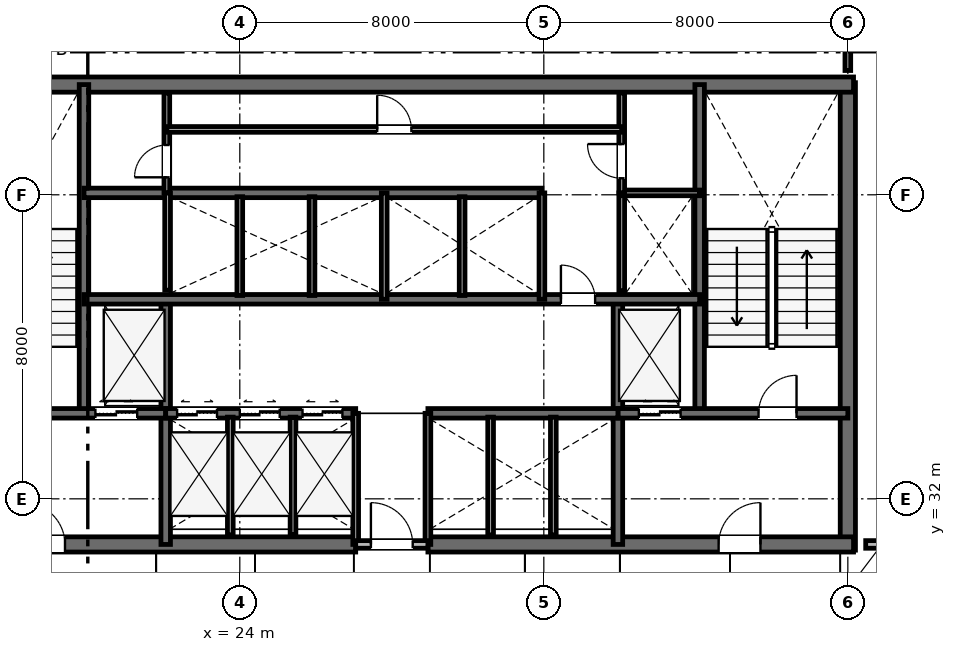
"""IFC4 building model, lengths in metres.
Left out: names, types, materials, properties, quantities, classifications, styles, units other than length and angle.
Written with IfcOpenShell. Run it as: python <this file> out.ifc"""

import sys

from ifc_helpers import new_model, si_unit, direction, frame, frame_2d, origin, place, context, subcontext, project, spatial, rectangle, extrude, element, fill, save


model = new_model("IFC4")
c1 = context("Model", 3, precision=1e-05, world=origin(), true_north=direction((0.0, 1.0)))
c2 = subcontext(c1, "Body", "Model", "MODEL_VIEW")
j1 = project(units=[si_unit("LENGTHUNIT", "METRE"), si_unit("PLANEANGLEUNIT", "RADIAN")], contexts=[c1])
p1 = place(None, origin())
s1 = spatial("IfcSite", under=j1, at=p1, CompositionType="ELEMENT")
p2 = place(p1, origin())
s2 = spatial("IfcBuilding", under=s1, at=p2, CompositionType="ELEMENT")
p3 = place(p2, frame((0.0, 0.0, 61.8)))
s3 = spatial("IfcBuildingStorey", under=s2, at=p3, CompositionType="ELEMENT", Elevation=61.8)
p4 = place(p3, frame((40.0, 30.65, 0.0), z_axis=(0.0, 0.0, 1.0), x_axis=(0.0, 1.0, 0.0)))
e1 = element("IfcWall", 1, at=p4, inside=s3, PredefinedType="SHEAR", context=c2, shape_type="SweptSolid", body=[
    extrude(rectangle(XDim=12.3, YDim=0.4, at=frame_2d((6.15, 0.0))), origin(), (0.0, 0.0, 1.0), 3.6),
])
p5 = place(p3, frame((15.85, 42.9, 0.0), z_axis=(0.0, 0.0, 1.0), x_axis=(1.0, 0.0, 0.0)))
e2 = element("IfcWall", 2, at=p5, inside=s3, PredefinedType="SHEAR", context=c2, shape_type="SweptSolid", body=[
    extrude(rectangle(XDim=24.3, YDim=0.4, at=frame_2d((12.15, 0.0))), origin(), (0.0, 0.0, 1.0), 3.6),
])
p6 = place(p3, frame((15.85, 30.8, 0.0), z_axis=(0.0, 0.0, 1.0), x_axis=(1.0, 0.0, 0.0)))
e3 = element("IfcWall", 3, at=p6, inside=s3, PredefinedType="SHEAR", context=c2, shape_type="SweptSolid", body=[
    extrude(rectangle(XDim=11.2, YDim=0.4, at=frame_2d((5.6, 0.0))), origin(), (0.0, 0.0, 1.0), 3.6),
])
p7 = place(p6, frame((2.45, 0.0, 0.0)))
e4 = element("IfcOpeningElement", 4, at=p7, cuts=e3, PredefinedType="OPENING", context=c2, shape_type="SweptSolid", body=[
    extrude(rectangle(XDim=1.1, YDim=2.15, at=frame_2d((0.55, 1.075))), frame((0.0, 0.21, 0.0), z_axis=(0.0, -1.0, 0.0), x_axis=(1.0, 0.0, 0.0)), (0.0, 0.0, 1.0), 0.42),
])
p8 = place(p3, frame((28.95, 30.8, 0.0), z_axis=(0.0, 0.0, 1.0), x_axis=(1.0, 0.0, 0.0)))
e5 = element("IfcWall", 5, at=p8, inside=s3, PredefinedType="SHEAR", context=c2, shape_type="SweptSolid", body=[
    extrude(rectangle(XDim=11.2, YDim=0.4, at=frame_2d((5.6, 0.0))), origin(), (0.0, 0.0, 1.0), 3.6),
])
p9 = place(p8, frame((7.65, 0.0, 0.0)))
e6 = element("IfcOpeningElement", 6, at=p9, cuts=e5, PredefinedType="OPENING", context=c2, shape_type="SweptSolid", body=[
    extrude(rectangle(XDim=1.1, YDim=2.15, at=frame_2d((0.55, 1.075))), frame((0.0, 0.21, 0.0), z_axis=(0.0, -1.0, 0.0), x_axis=(1.0, 0.0, 0.0)), (0.0, 0.0, 1.0), 0.42),
])
for number, where, z_axis, x_axis in (
    (7, (19.9, 34.25, 0.0), (0.0, 0.0, 1.0), (0.0, 1.0, 0.0)),
    (8, (36.1, 34.25, 0.0), (0.0, 0.0, 1.0), (0.0, 1.0, 0.0)),
):
    element("IfcWall", number, at=place(p3, frame(where, z_axis=z_axis, x_axis=x_axis)), inside=s3, PredefinedType="SHEAR", context=c2, shape_type="SweptSolid", body=[
        extrude(rectangle(XDim=8.65, YDim=0.25, at=frame_2d((4.325, 0.0))), origin(), (0.0, 0.0, 1.0), 3.6),
    ])
for number, where, z_axis, x_axis in (
    (9, (22.05, 30.8, 0.0), (0.0, 0.0, 1.0), (0.0, 1.0, 0.0)),
    (10, (33.95, 30.8, 0.0), (0.0, 0.0, 1.0), (0.0, 1.0, 0.0)),
):
    element("IfcWall", number, at=place(p3, frame(where, z_axis=z_axis, x_axis=x_axis)), inside=s3, PredefinedType="SHEAR", context=c2, shape_type="SweptSolid", body=[
        extrude(rectangle(XDim=6.45, YDim=0.25, at=frame_2d((3.225, 0.0))), origin(), (0.0, 0.0, 1.0), 3.6),
    ])
p10 = place(p3, frame((16.0, 34.25, 0.0), z_axis=(0.0, 0.0, 1.0), x_axis=(1.0, 0.0, 0.0)))
e11 = element("IfcWall", 11, at=p10, inside=s3, PredefinedType="SHEAR", context=c2, shape_type="SweptSolid", body=[
    extrude(rectangle(XDim=6.05, YDim=0.25, at=frame_2d((3.025, 0.0))), origin(), (0.0, 0.0, 1.0), 3.6),
])
p11 = place(p10, frame((1.25, 0.0, 0.0)))
e12 = element("IfcOpeningElement", 12, at=p11, cuts=e11, PredefinedType="OPENING", context=c2, shape_type="SweptSolid", body=[
    extrude(rectangle(XDim=1.0, YDim=2.15, at=frame_2d((0.5, 1.075))), frame((0.0, 0.135, 0.0), z_axis=(0.0, -1.0, 0.0), x_axis=(1.0, 0.0, 0.0)), (0.0, 0.0, 1.0), 0.27),
])
p12 = place(p10, frame((4.2, 0.0, 0.0)))
e13 = element("IfcOpeningElement", 13, at=p12, cuts=e11, PredefinedType="OPENING", context=c2, shape_type="SweptSolid", body=[
    extrude(rectangle(XDim=1.1, YDim=2.15, at=frame_2d((0.55, 1.075))), frame((0.0, 0.135, 0.0), z_axis=(0.0, -1.0, 0.0), x_axis=(1.0, 0.0, 0.0)), (0.0, 0.0, 1.0), 0.27),
])
p13 = place(p3, frame((33.95, 34.25, 0.0), z_axis=(0.0, 0.0, 1.0), x_axis=(1.0, 0.0, 0.0)))
e14 = element("IfcWall", 14, at=p13, inside=s3, PredefinedType="SHEAR", context=c2, shape_type="SweptSolid", body=[
    extrude(rectangle(XDim=6.05, YDim=0.25, at=frame_2d((3.025, 0.0))), origin(), (0.0, 0.0, 1.0), 3.6),
])
p14 = place(p13, frame((3.7, 0.0, 0.0)))
e15 = element("IfcOpeningElement", 15, at=p14, cuts=e14, PredefinedType="OPENING", context=c2, shape_type="SweptSolid", body=[
    extrude(rectangle(XDim=1.0, YDim=2.15, at=frame_2d((0.5, 1.075))), frame((0.0, 0.135, 0.0), z_axis=(0.0, -1.0, 0.0), x_axis=(1.0, 0.0, 0.0)), (0.0, 0.0, 1.0), 0.27),
])
p15 = place(p13, frame((0.55, 0.0, 0.0)))
e16 = element("IfcOpeningElement", 16, at=p15, cuts=e14, PredefinedType="OPENING", context=c2, shape_type="SweptSolid", body=[
    extrude(rectangle(XDim=1.1, YDim=2.15, at=frame_2d((0.55, 1.075))), frame((0.0, 0.135, 0.0), z_axis=(0.0, -1.0, 0.0), x_axis=(1.0, 0.0, 0.0)), (0.0, 0.0, 1.0), 0.27),
])
p16 = place(p3, frame((22.05, 34.25, 0.0), z_axis=(0.0, 0.0, 1.0), x_axis=(1.0, 0.0, 0.0)))
e17 = element("IfcWall", 17, at=p16, inside=s3, PredefinedType="SHEAR", context=c2, shape_type="SweptSolid", body=[
    extrude(rectangle(XDim=5.0, YDim=0.25, at=frame_2d((2.5, 0.0))), origin(), (0.0, 0.0, 1.0), 3.6),
])
p17 = place(p16, frame((0.3, 0.0, 0.0)))
e18 = element("IfcOpeningElement", 18, at=p17, cuts=e17, PredefinedType="OPENING", context=c2, shape_type="SweptSolid", body=[
    extrude(rectangle(XDim=1.05, YDim=2.15, at=frame_2d((0.525, 1.075))), frame((0.0, 0.135, 0.0), z_axis=(0.0, -1.0, 0.0), x_axis=(1.0, 0.0, 0.0)), (0.0, 0.0, 1.0), 0.27),
])
p18 = place(p16, frame((1.95, 0.0, 0.0)))
e19 = element("IfcOpeningElement", 19, at=p18, cuts=e17, PredefinedType="OPENING", context=c2, shape_type="SweptSolid", body=[
    extrude(rectangle(XDim=1.05, YDim=2.15, at=frame_2d((0.525, 1.075))), frame((0.0, 0.135, 0.0), z_axis=(0.0, -1.0, 0.0), x_axis=(1.0, 0.0, 0.0)), (0.0, 0.0, 1.0), 0.27),
])
p19 = place(p16, frame((3.6, 0.0, 0.0)))
e20 = element("IfcOpeningElement", 20, at=p19, cuts=e17, PredefinedType="OPENING", context=c2, shape_type="SweptSolid", body=[
    extrude(rectangle(XDim=1.05, YDim=2.15, at=frame_2d((0.525, 1.075))), frame((0.0, 0.135, 0.0), z_axis=(0.0, -1.0, 0.0), x_axis=(1.0, 0.0, 0.0)), (0.0, 0.0, 1.0), 0.27),
])
p20 = place(p3, frame((28.95, 34.25, 0.0), z_axis=(0.0, 0.0, 1.0), x_axis=(1.0, 0.0, 0.0)))
e21 = element("IfcWall", 21, at=p20, inside=s3, PredefinedType="SHEAR", context=c2, shape_type="SweptSolid", body=[
    extrude(rectangle(XDim=5.0, YDim=0.25, at=frame_2d((2.5, 0.0))), origin(), (0.0, 0.0, 1.0), 3.6),
])
p21 = place(p3, frame((19.9, 37.25, 0.0), z_axis=(0.0, 0.0, 1.0), x_axis=(1.0, 0.0, 0.0)))
e22 = element("IfcWall", 22, at=p21, inside=s3, PredefinedType="SHEAR", context=c2, shape_type="SweptSolid", body=[
    extrude(rectangle(XDim=16.2, YDim=0.25, at=frame_2d((8.1, 0.0))), origin(), (0.0, 0.0, 1.0), 3.6),
])
p22 = place(p21, frame((12.55, 0.0, 0.0)))
e23 = element("IfcOpeningElement", 23, at=p22, cuts=e22, PredefinedType="OPENING", context=c2, shape_type="SweptSolid", body=[
    extrude(rectangle(XDim=0.9, YDim=2.15, at=frame_2d((0.45, 1.075))), frame((0.0, 0.135, 0.0), z_axis=(0.0, -1.0, 0.0), x_axis=(1.0, 0.0, 0.0)), (0.0, 0.0, 1.0), 0.27),
])
p23 = place(p3, frame((19.9, 40.05, 0.0), z_axis=(0.0, 0.0, 1.0), x_axis=(1.0, 0.0, 0.0)))
e24 = element("IfcWall", 24, at=p23, inside=s3, PredefinedType="SHEAR", context=c2, shape_type="SweptSolid", body=[
    extrude(rectangle(XDim=12.05, YDim=0.25, at=frame_2d((6.025, 0.0))), origin(), (0.0, 0.0, 1.0), 3.6),
])
for number, where, z_axis, x_axis in (
    (25, (27.05, 30.8, 0.0), (0.0, 0.0, 1.0), (0.0, 1.0, 0.0)),
    (26, (28.95, 30.8, 0.0), (0.0, 0.0, 1.0), (0.0, 1.0, 0.0)),
):
    element("IfcWall", number, at=place(p3, frame(where, z_axis=z_axis, x_axis=x_axis)), inside=s3, PredefinedType="PLUMBINGWALL", context=c2, shape_type="SweptSolid", body=[
        extrude(rectangle(XDim=3.45, YDim=0.15, at=frame_2d((1.725, 0.0))), origin(), (0.0, 0.0, 1.0), 3.33),
    ])
p24 = place(p3, frame((27.05, 30.8, 0.0), z_axis=(0.0, 0.0, 1.0), x_axis=(1.0, 0.0, 0.0)))
e27 = element("IfcWall", 27, at=p24, inside=s3, PredefinedType="PARTITIONING", context=c2, shape_type="SweptSolid", body=[
    extrude(rectangle(XDim=1.9, YDim=0.2, at=frame_2d((0.95, 0.0))), origin(), (0.0, 0.0, 1.0), 3.33),
])
p25 = place(p24, frame((0.4, 0.0, 0.0)))
e28 = element("IfcOpeningElement", 28, at=p25, cuts=e27, PredefinedType="OPENING", context=c2, shape_type="SweptSolid", body=[
    extrude(rectangle(XDim=1.1, YDim=2.15, at=frame_2d((0.55, 1.075))), frame((0.0, 0.11, 0.0), z_axis=(0.0, -1.0, 0.0), x_axis=(1.0, 0.0, 0.0)), (0.0, 0.0, 1.0), 0.22),
])
for number, where, z_axis, x_axis in (
    (29, (23.75, 31.05, 0.0), (0.0, 0.0, 1.0), (0.0, 1.0, 0.0)),
    (30, (25.4, 31.05, 0.0), (0.0, 0.0, 1.0), (0.0, 1.0, 0.0)),
    (31, (30.6, 31.05, 0.0), (0.0, 0.0, 1.0), (0.0, 1.0, 0.0)),
    (32, (32.25, 31.05, 0.0), (0.0, 0.0, 1.0), (0.0, 1.0, 0.0)),
):
    element("IfcWall", number, at=place(p3, frame(where, z_axis=z_axis, x_axis=x_axis)), inside=s3, PredefinedType="PLUMBINGWALL", context=c2, shape_type="SweptSolid", body=[
        extrude(rectangle(XDim=3.1, YDim=0.15, at=frame_2d((1.55, 0.0))), origin(), (0.0, 0.0, 1.0), 3.33),
    ])
p26 = place(p3, frame((22.1, 37.49, 0.0), z_axis=(0.0, 0.0, 1.0), x_axis=(0.0, 1.0, 0.0)))
e33 = element("IfcWall", 33, at=p26, inside=s3, PredefinedType="PLUMBINGWALL", context=c2, shape_type="SweptSolid", body=[
    extrude(rectangle(XDim=2.56, YDim=0.15, at=frame_2d((1.28, 0.0))), origin(), (0.0, 0.0, 1.0), 3.33),
])
p27 = place(p3, frame((27.8, 37.25, 0.0), z_axis=(0.0, 0.0, 1.0), x_axis=(0.0, 1.0, 0.0)))
e34 = element("IfcWall", 34, at=p27, inside=s3, PredefinedType="PLUMBINGWALL", context=c2, shape_type="SweptSolid", body=[
    extrude(rectangle(XDim=2.8, YDim=0.15, at=frame_2d((1.4, 0.0))), origin(), (0.0, 0.0, 1.0), 3.33),
])
for number, where, z_axis, x_axis in (
    (35, (24.0, 37.35, 0.0), (0.0, 0.0, 1.0), (0.0, 1.0, 0.0)),
    (36, (25.9, 37.35, 0.0), (0.0, 0.0, 1.0), (0.0, 1.0, 0.0)),
):
    element("IfcWall", number, at=place(p3, frame(where, z_axis=z_axis, x_axis=x_axis)), inside=s3, PredefinedType="PLUMBINGWALL", context=c2, shape_type="SweptSolid", body=[
        extrude(rectangle(XDim=2.6, YDim=0.15, at=frame_2d((1.3, 0.0))), origin(), (0.0, 0.0, 1.0), 3.33),
    ])
p28 = place(p3, frame((31.95, 37.25, 0.0), z_axis=(0.0, 0.0, 1.0), x_axis=(0.0, 1.0, 0.0)))
e37 = element("IfcWall", 37, at=p28, inside=s3, PredefinedType="PLUMBINGWALL", context=c2, shape_type="SweptSolid", body=[
    extrude(rectangle(XDim=2.8, YDim=0.15, at=frame_2d((1.4, 0.0))), origin(), (0.0, 0.0, 1.0), 3.33),
])
p29 = place(p3, frame((29.85, 37.35, 0.0), z_axis=(0.0, 0.0, 1.0), x_axis=(0.0, 1.0, 0.0)))
e38 = element("IfcWall", 38, at=p29, inside=s3, PredefinedType="PLUMBINGWALL", context=c2, shape_type="SweptSolid", body=[
    extrude(rectangle(XDim=2.6, YDim=0.15, at=frame_2d((1.3, 0.0))), origin(), (0.0, 0.0, 1.0), 3.33),
])
p30 = place(p3, frame((34.05, 37.473, 0.0), z_axis=(0.0, 0.0, 1.0), x_axis=(0.0, 1.0, 0.0)))
e39 = element("IfcWall", 39, at=p30, inside=s3, PredefinedType="PLUMBINGWALL", context=c2, shape_type="SweptSolid", body=[
    extrude(rectangle(XDim=2.577, YDim=0.15, at=frame_2d((1.288, 0.0))), origin(), (0.0, 0.0, 1.0), 3.33),
])
p31 = place(p3, frame((34.05, 40.05, 0.0), z_axis=(0.0, 0.0, 1.0), x_axis=(1.0, 0.0, 0.0)))
e40 = element("IfcWall", 40, at=p31, inside=s3, PredefinedType="PARTITIONING", context=c2, shape_type="SweptSolid", body=[
    extrude(rectangle(XDim=2.05, YDim=0.15, at=frame_2d((1.025, 0.0))), origin(), (0.0, 0.0, 1.0), 3.33),
])
p32 = place(p3, frame((34.05, 40.05, 0.0), z_axis=(0.0, 0.0, 1.0), x_axis=(0.0, 1.0, 0.0)))
e41 = element("IfcWall", 41, at=p32, inside=s3, PredefinedType="PARTITIONING", context=c2, shape_type="SweptSolid", body=[
    extrude(rectangle(XDim=2.63, YDim=0.15, at=frame_2d((1.315, 0.0))), origin(), (0.0, 0.0, 1.0), 3.33),
])
p33 = place(p32, frame((0.385, 0.0, 0.0)))
e42 = element("IfcOpeningElement", 42, at=p33, cuts=e41, PredefinedType="OPENING", context=c2, shape_type="SweptSolid", body=[
    extrude(rectangle(XDim=0.9, YDim=2.15, at=frame_2d((0.45, 1.075))), frame((0.0, 0.085, 0.0), z_axis=(0.0, -1.0, 0.0), x_axis=(1.0, 0.0, 0.0)), (0.0, 0.0, 1.0), 0.17),
])
p34 = place(p3, frame((22.08, 40.05, 0.0), z_axis=(0.0, 0.0, 1.0), x_axis=(0.0, 1.0, 0.0)))
e43 = element("IfcWall", 43, at=p34, inside=s3, PredefinedType="PARTITIONING", context=c2, shape_type="SweptSolid", body=[
    extrude(rectangle(XDim=2.63, YDim=0.15, at=frame_2d((1.315, 0.0))), origin(), (0.0, 0.0, 1.0), 3.33),
])
p35 = place(p34, frame((0.41, 0.0, 0.0)))
e44 = element("IfcOpeningElement", 44, at=p35, cuts=e43, PredefinedType="OPENING", context=c2, shape_type="SweptSolid", body=[
    extrude(rectangle(XDim=0.85, YDim=2.15, at=frame_2d((0.425, 1.075))), frame((0.0, 0.085, 0.0), z_axis=(0.0, -1.0, 0.0), x_axis=(1.0, 0.0, 0.0)), (0.0, 0.0, 1.0), 0.17),
])
p36 = place(p3, frame((22.08, 41.72, 0.0), z_axis=(0.0, 0.0, 1.0), x_axis=(1.0, 0.0, 0.0)))
e45 = element("IfcWall", 45, at=p36, inside=s3, PredefinedType="PARTITIONING", context=c2, shape_type="SweptSolid", body=[
    extrude(rectangle(XDim=11.97, YDim=0.15, at=frame_2d((5.985, 0.0))), origin(), (0.0, 0.0, 1.0), 3.33),
])
p37 = place(p36, frame((5.535, 0.0, 0.0)))
e46 = element("IfcOpeningElement", 46, at=p37, cuts=e45, PredefinedType="OPENING", context=c2, shape_type="SweptSolid", body=[
    extrude(rectangle(XDim=0.9, YDim=2.15, at=frame_2d((0.45, 1.075))), frame((0.0, 0.085, 0.0), z_axis=(0.0, -1.0, 0.0), x_axis=(1.0, 0.0, 0.0)), (0.0, 0.0, 1.0), 0.17),
])
p38 = place(p3, frame((40.0, 43.27, 0.0), z_axis=(0.0, 0.0, 1.0), x_axis=(0.0, 1.0, 0.0)))
e47 = element("IfcWall", 47, at=p38, inside=s3, PredefinedType="PARTITIONING", context=c2, shape_type="SweptSolid", body=[
    extrude(rectangle(XDim=4.63, YDim=0.15, at=frame_2d((2.315, 0.0))), origin(), (0.0, 0.0, 1.0), 2.93),
])
p39 = place(p3, frame((40.47, 30.8, 0.0), z_axis=(0.0, 0.0, 1.0), x_axis=(1.0, 0.0, 0.0)))
e48 = element("IfcWall", 48, at=p39, inside=s3, PredefinedType="PARTITIONING", context=c2, shape_type="SweptSolid", body=[
    extrude(rectangle(XDim=15.43, YDim=0.2, at=frame_2d((7.715, 0.0))), origin(), (0.0, 0.0, 1.0), 2.82),
])
p40 = place(p39, frame((6.673, 0.0, 0.0)))
e49 = element("IfcOpeningElement", 49, at=p40, cuts=e48, PredefinedType="OPENING", context=c2, shape_type="SweptSolid", body=[
    extrude(rectangle(XDim=0.95, YDim=2.15, at=frame_2d((0.475, 1.075))), frame((0.0, 0.11, 0.0), z_axis=(0.0, -1.0, 0.0), x_axis=(1.0, 0.0, 0.0)), (0.0, 0.0, 1.0), 0.22),
])
p41 = place(p25, origin())
e50 = element("IfcDoor", 50, at=p41, inside=s3, OperationType="SINGLE_SWING_LEFT", PredefinedType="DOOR", context=c2, shape_type="SweptSolid", body=[
    extrude(rectangle(XDim=1.1, YDim=2.15, at=frame_2d((0.55, 1.075))), frame((0.0, 0.025, 0.0), z_axis=(0.0, -1.0, 0.0), x_axis=(1.0, 0.0, 0.0)), (0.0, 0.0, 1.0), 0.05),
])
fill(e28, e50)
p42 = place(p14, origin())
e51 = element("IfcDoor", 51, at=p42, inside=s3, OperationType="SINGLE_SWING_RIGHT", PredefinedType="DOOR", context=c2, shape_type="SweptSolid", body=[
    extrude(rectangle(XDim=1.0, YDim=2.15, at=frame_2d((0.5, 1.075))), frame((0.0, 0.025, 0.0), z_axis=(0.0, -1.0, 0.0), x_axis=(1.0, 0.0, 0.0)), (0.0, 0.0, 1.0), 0.05),
])
fill(e15, e51)
p43 = place(p7, origin())
e52 = element("IfcDoor", 52, at=p43, inside=s3, OperationType="SINGLE_SWING_LEFT", PredefinedType="DOOR", context=c2, shape_type="SweptSolid", body=[
    extrude(rectangle(XDim=1.1, YDim=2.15, at=frame_2d((0.55, 1.075))), frame((0.0, 0.025, 0.0), z_axis=(0.0, -1.0, 0.0), x_axis=(1.0, 0.0, 0.0)), (0.0, 0.0, 1.0), 0.05),
])
fill(e4, e52)
p44 = place(p9, origin())
e53 = element("IfcDoor", 53, at=p44, inside=s3, OperationType="SINGLE_SWING_RIGHT", PredefinedType="DOOR", context=c2, shape_type="SweptSolid", body=[
    extrude(rectangle(XDim=1.1, YDim=2.15, at=frame_2d((0.55, 1.075))), frame((0.0, 0.025, 0.0), z_axis=(0.0, -1.0, 0.0), x_axis=(1.0, 0.0, 0.0)), (0.0, 0.0, 1.0), 0.05),
])
fill(e6, e53)
p45 = place(p22, origin())
e54 = element("IfcDoor", 54, at=p45, inside=s3, OperationType="SINGLE_SWING_LEFT", PredefinedType="DOOR", context=c2, shape_type="SweptSolid", body=[
    extrude(rectangle(XDim=0.9, YDim=2.15, at=frame_2d((0.45, 1.075))), frame((0.0, 0.025, 0.0), z_axis=(0.0, -1.0, 0.0), x_axis=(1.0, 0.0, 0.0)), (0.0, 0.0, 1.0), 0.05),
])
fill(e23, e54)
p46 = place(p33, origin())
e55 = element("IfcDoor", 55, at=p46, inside=s3, OperationType="SINGLE_SWING_RIGHT", PredefinedType="DOOR", context=c2, shape_type="SweptSolid", body=[
    extrude(rectangle(XDim=0.9, YDim=2.15, at=frame_2d((0.45, 1.075))), frame((0.0, 0.025, 0.0), z_axis=(0.0, -1.0, 0.0), x_axis=(1.0, 0.0, 0.0)), (0.0, 0.0, 1.0), 0.05),
])
fill(e42, e55)
p47 = place(p35, origin())
e56 = element("IfcDoor", 56, at=p47, inside=s3, OperationType="SINGLE_SWING_LEFT", PredefinedType="DOOR", context=c2, shape_type="SweptSolid", body=[
    extrude(rectangle(XDim=0.85, YDim=2.15, at=frame_2d((0.425, 1.075))), frame((0.0, 0.025, 0.0), z_axis=(0.0, -1.0, 0.0), x_axis=(1.0, 0.0, 0.0)), (0.0, 0.0, 1.0), 0.05),
])
fill(e44, e56)
p48 = place(p37, origin())
e57 = element("IfcDoor", 57, at=p48, inside=s3, OperationType="SINGLE_SWING_LEFT", PredefinedType="DOOR", context=c2, shape_type="SweptSolid", body=[
    extrude(rectangle(XDim=0.9, YDim=2.15, at=frame_2d((0.45, 1.075))), frame((0.0, 0.025, 0.0), z_axis=(0.0, -1.0, 0.0), x_axis=(1.0, 0.0, 0.0)), (0.0, 0.0, 1.0), 0.05),
])
fill(e46, e57)
p49 = place(p12, origin())
e58 = element("IfcDoor", 58, at=p49, inside=s3, OperationType="DOUBLE_DOOR_SLIDING", PredefinedType="DOOR", context=c2, shape_type="SweptSolid", body=[
    extrude(rectangle(XDim=1.1, YDim=2.15, at=frame_2d((0.55, 1.075))), frame((0.0, 0.025, 0.0), z_axis=(0.0, -1.0, 0.0), x_axis=(1.0, 0.0, 0.0)), (0.0, 0.0, 1.0), 0.05),
])
fill(e13, e58)
p50 = place(p15, origin())
e59 = element("IfcDoor", 59, at=p50, inside=s3, OperationType="DOUBLE_DOOR_SLIDING", PredefinedType="DOOR", context=c2, shape_type="SweptSolid", body=[
    extrude(rectangle(XDim=1.1, YDim=2.15, at=frame_2d((0.55, 1.075))), frame((0.0, 0.025, 0.0), z_axis=(0.0, -1.0, 0.0), x_axis=(1.0, 0.0, 0.0)), (0.0, 0.0, 1.0), 0.05),
])
fill(e16, e59)
p51 = place(p17, origin())
e60 = element("IfcDoor", 60, at=p51, inside=s3, OperationType="DOUBLE_DOOR_SLIDING", PredefinedType="DOOR", context=c2, shape_type="SweptSolid", body=[
    extrude(rectangle(XDim=1.05, YDim=2.15, at=frame_2d((0.525, 1.075))), frame((0.0, 0.025, 0.0), z_axis=(0.0, -1.0, 0.0), x_axis=(1.0, 0.0, 0.0)), (0.0, 0.0, 1.0), 0.05),
])
fill(e18, e60)
p52 = place(p18, origin())
e61 = element("IfcDoor", 61, at=p52, inside=s3, OperationType="DOUBLE_DOOR_SLIDING", PredefinedType="DOOR", context=c2, shape_type="SweptSolid", body=[
    extrude(rectangle(XDim=1.05, YDim=2.15, at=frame_2d((0.525, 1.075))), frame((0.0, 0.025, 0.0), z_axis=(0.0, -1.0, 0.0), x_axis=(1.0, 0.0, 0.0)), (0.0, 0.0, 1.0), 0.05),
])
fill(e19, e61)
p53 = place(p19, origin())
e62 = element("IfcDoor", 62, at=p53, inside=s3, OperationType="DOUBLE_DOOR_SLIDING", PredefinedType="DOOR", context=c2, shape_type="SweptSolid", body=[
    extrude(rectangle(XDim=1.05, YDim=2.15, at=frame_2d((0.525, 1.075))), frame((0.0, 0.025, 0.0), z_axis=(0.0, -1.0, 0.0), x_axis=(1.0, 0.0, 0.0)), (0.0, 0.0, 1.0), 0.05),
])
fill(e20, e62)
save(model, sys.argv[1])
